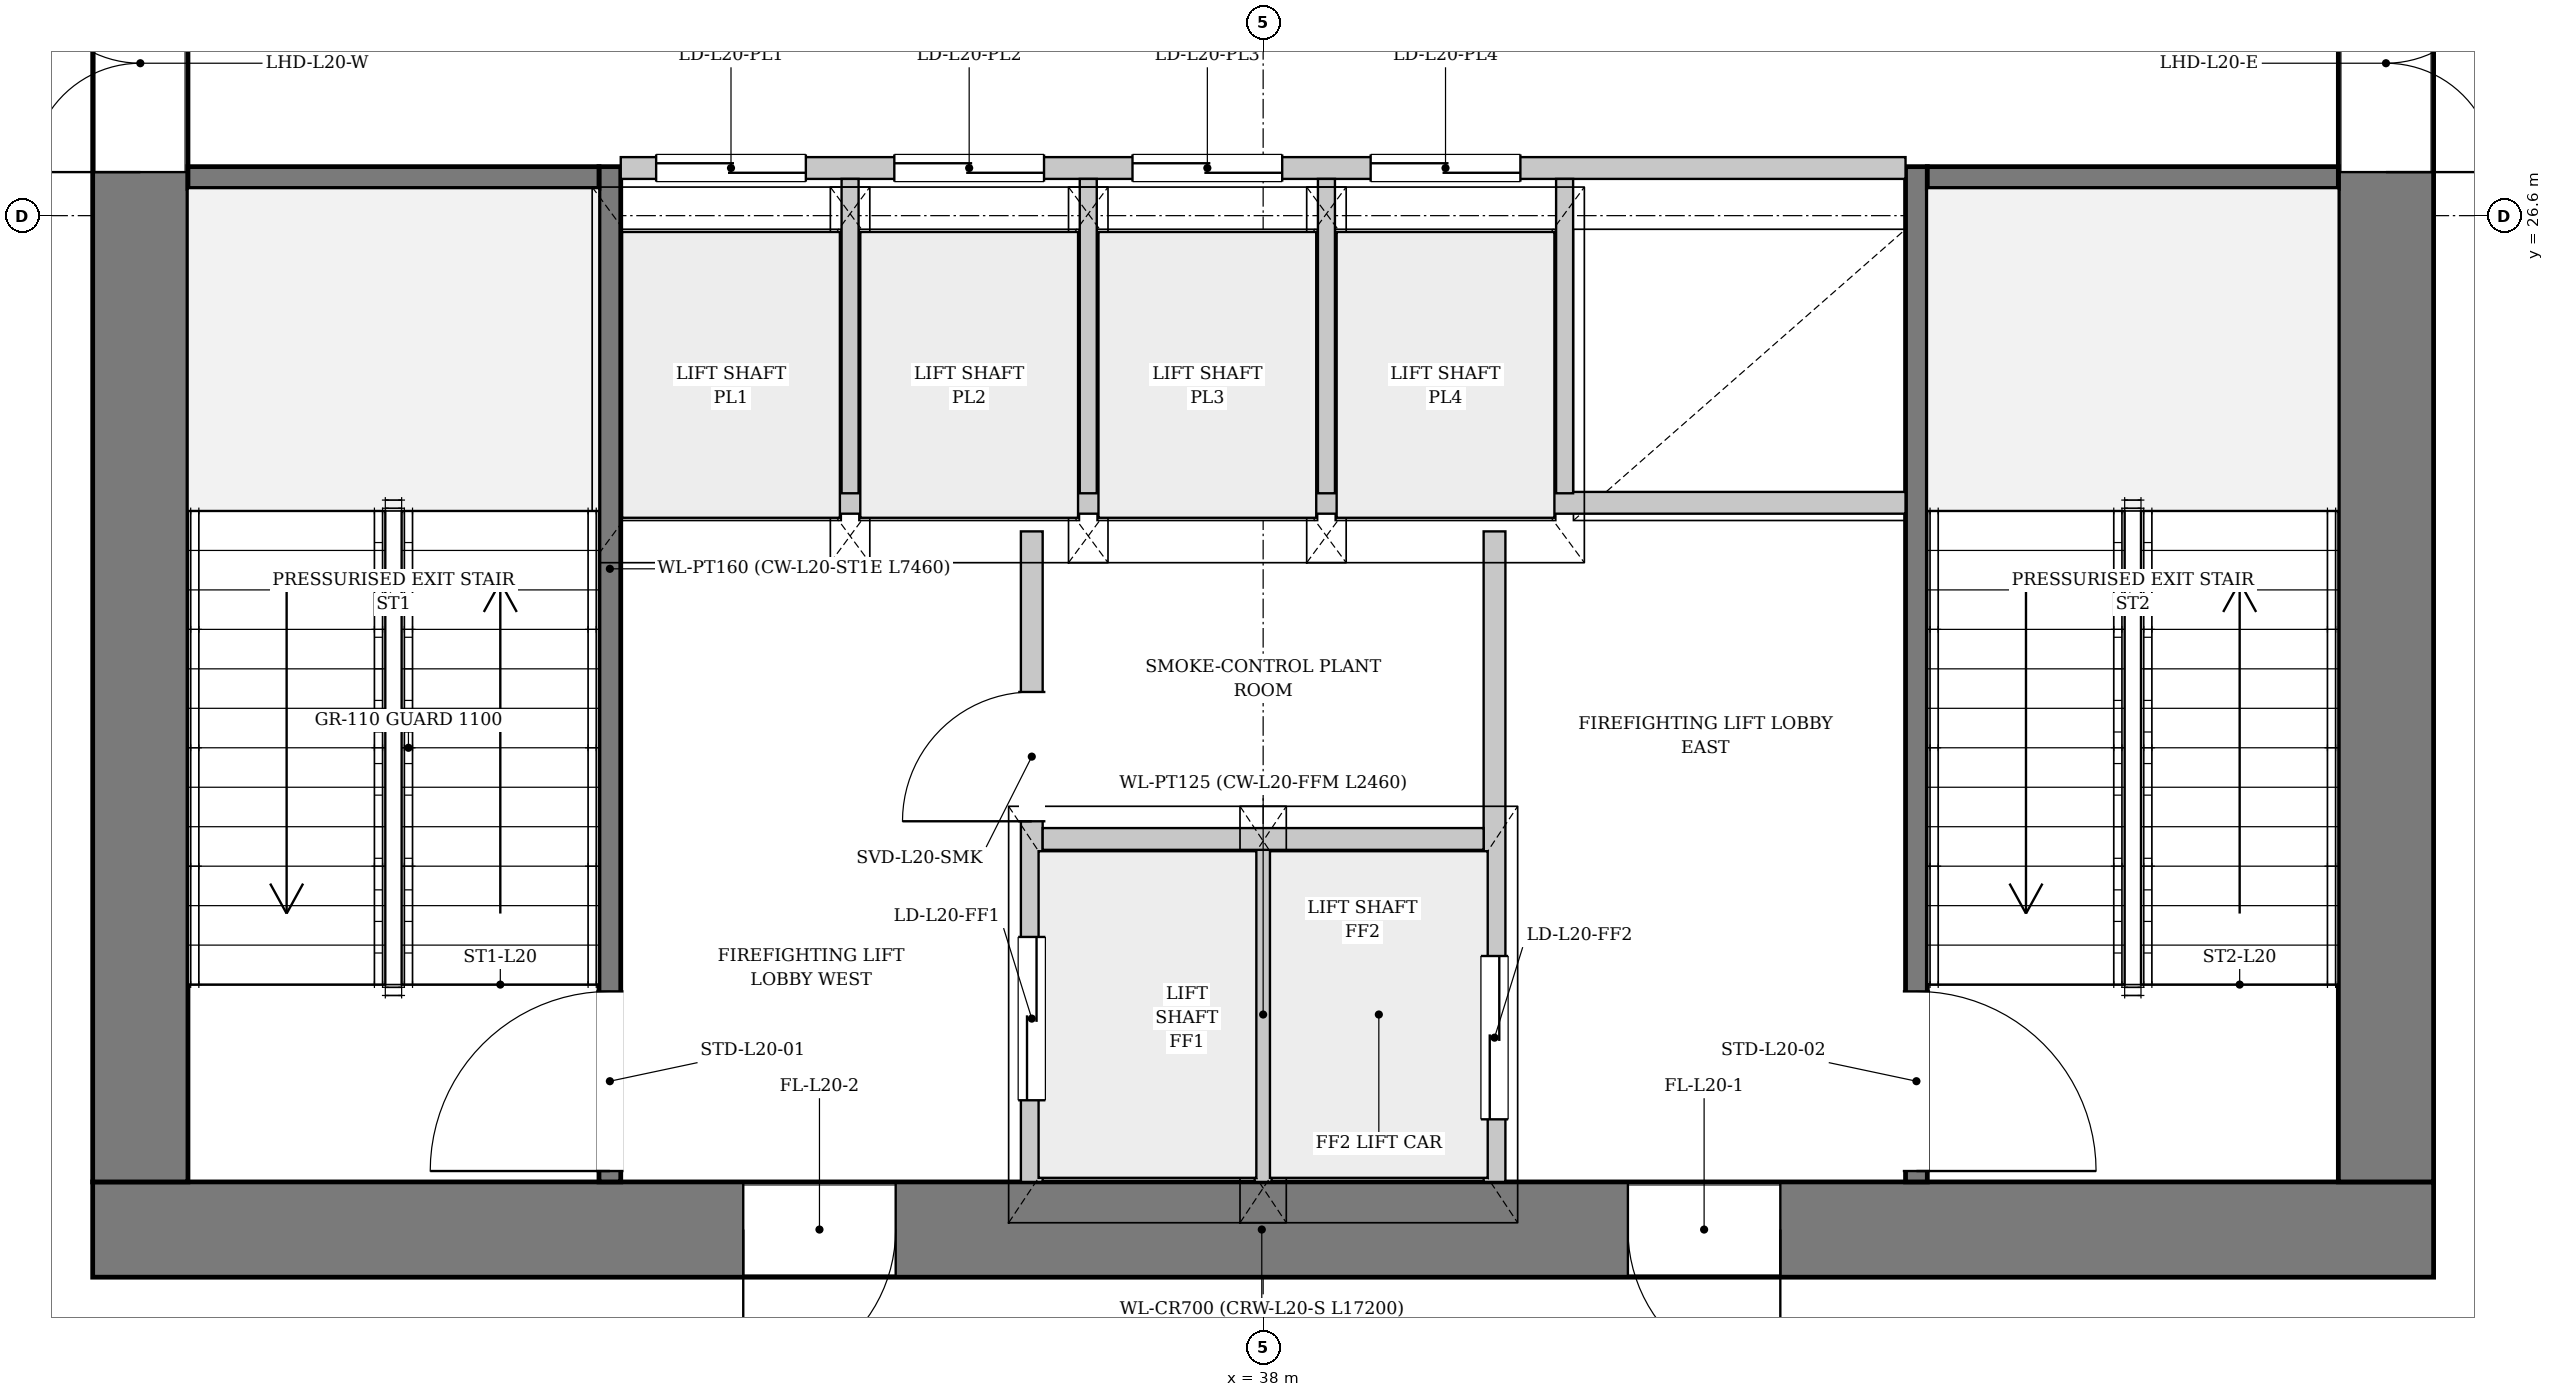
"""IFC4 building model, lengths in metres.
Left out: names, types, materials, properties, quantities, classifications, styles, units other than length and angle.
Written with IfcOpenShell. Run it as: python <this file> out.ifc"""

import sys

from ifc_helpers import new_model, si_unit, direction, frame, frame_2d, origin, place, context, subcontext, project, spatial, rectangle, extrude, source, transform, mapped, element, fill, save


model = new_model("IFC4")
c1 = context("Model", 3, precision=1e-05, world=origin(), true_north=direction((0.0, 1.0)))
c2 = subcontext(c1, "Body", "Model", "MODEL_VIEW")
j1 = project(units=[si_unit("LENGTHUNIT", "METRE"), si_unit("PLANEANGLEUNIT", "RADIAN")], contexts=[c1])
p1 = place(None, origin())
s1 = spatial("IfcSite", under=j1, at=p1, CompositionType="ELEMENT")
p2 = place(p1, origin())
s2 = spatial("IfcBuilding", under=s1, at=p2, CompositionType="ELEMENT")
p3 = place(p2, frame((0.0, 0.0, 79.9)))
s3 = spatial("IfcBuildingStorey", under=s2, at=p3, CompositionType="ELEMENT", Elevation=79.9)
p4 = place(p3, frame((46.6, 19.15, 0.0), z_axis=(0.0, 0.0, 1.0), x_axis=(-1.0, 0.0, 0.0)))
e1 = element("IfcWall", 1, at=p4, inside=s3, PredefinedType="SHEAR", context=c2, shape_type="SweptSolid", body=[
    extrude(rectangle(XDim=17.2, YDim=0.7, at=frame_2d((8.6, 0.0))), origin(), (0.0, 0.0, 1.0), 4.25),
])
p5 = place(p4, frame((4.8, 0.0, 0.0)))
e2 = element("IfcOpeningElement", 2, at=p5, cuts=e1, PredefinedType="OPENING", context=c2, shape_type="SweptSolid", body=[
    extrude(rectangle(XDim=1.12, YDim=2.25, at=frame_2d((0.56, 1.125))), frame((0.0, 0.36, 0.0), z_axis=(0.0, -1.0, 0.0), x_axis=(1.0, 0.0, 0.0)), (0.0, 0.0, 1.0), 0.72),
])
p6 = place(p4, frame((11.3, 0.0, 0.0)))
e3 = element("IfcOpeningElement", 3, at=p6, cuts=e1, PredefinedType="OPENING", context=c2, shape_type="SweptSolid", body=[
    extrude(rectangle(XDim=1.12, YDim=2.25, at=frame_2d((0.56, 1.125))), frame((0.0, 0.36, 0.0), z_axis=(0.0, -1.0, 0.0), x_axis=(1.0, 0.0, 0.0)), (0.0, 0.0, 1.0), 0.72),
])
p7 = place(p3, frame((29.75, 19.5, 0.0), z_axis=(0.0, 0.0, 1.0), x_axis=(0.0, 1.0, 0.0)))
e4 = element("IfcWall", 4, at=p7, inside=s3, PredefinedType="SHEAR", context=c2, shape_type="SweptSolid", body=[
    extrude(rectangle(XDim=14.2, YDim=0.7, at=frame_2d((7.1, 0.0))), origin(), (0.0, 0.0, 1.0), 4.25),
])
p8 = place(p7, frame((7.42, 0.0, 0.0)))
e5 = element("IfcOpeningElement", 5, at=p8, cuts=e4, PredefinedType="OPENING", context=c2, shape_type="SweptSolid", body=[
    extrude(rectangle(XDim=1.6, YDim=2.2, at=frame_2d((0.8, 1.1))), frame((0.0, 0.36, 0.0), z_axis=(0.0, -1.0, 0.0), x_axis=(1.0, 0.0, 0.0)), (0.0, 0.0, 1.0), 0.72),
])
p9 = place(p3, frame((46.25, 33.7, 0.0), z_axis=(0.0, 0.0, 1.0), x_axis=(0.0, -1.0, 0.0)))
e6 = element("IfcWall", 6, at=p9, inside=s3, PredefinedType="SHEAR", context=c2, shape_type="SweptSolid", body=[
    extrude(rectangle(XDim=14.2, YDim=0.7, at=frame_2d((7.1, 0.0))), origin(), (0.0, 0.0, 1.0), 4.25),
])
p10 = place(p9, frame((5.18, 0.0, 0.0)))
e7 = element("IfcOpeningElement", 7, at=p10, cuts=e6, PredefinedType="OPENING", context=c2, shape_type="SweptSolid", body=[
    extrude(rectangle(XDim=1.6, YDim=2.2, at=frame_2d((0.8, 1.1))), frame((0.0, 0.36, 0.0), z_axis=(0.0, -1.0, 0.0), x_axis=(1.0, 0.0, 0.0)), (0.0, 0.0, 1.0), 0.72),
])
p11 = place(p3, frame((33.2, 19.5, 0.0), z_axis=(0.0, 0.0, 1.0), x_axis=(0.0, 1.0, 0.0)))
e8 = element("IfcWall", 8, at=p11, inside=s3, PredefinedType="PARTITIONING", context=c2, shape_type="SweptSolid", body=[
    extrude(rectangle(XDim=7.46, YDim=0.16, at=frame_2d((3.73, 0.0))), origin(), (0.0, 0.0, 1.0), 4.25),
])
p12 = place(p11, frame((0.08, 0.0, 0.0)))
e9 = element("IfcOpeningElement", 9, at=p12, cuts=e8, PredefinedType="OPENING", context=c2, shape_type="SweptSolid", body=[
    extrude(rectangle(XDim=1.32, YDim=2.2, at=frame_2d((0.66, 1.1))), frame((0.0, 0.09, 0.0), z_axis=(0.0, -1.0, 0.0), x_axis=(1.0, 0.0, 0.0)), (0.0, 0.0, 1.0), 0.18),
])
p13 = place(p3, frame((30.1, 26.88, 0.0), z_axis=(0.0, 0.0, 1.0), x_axis=(1.0, 0.0, 0.0)))
e10 = element("IfcWall", 10, at=p13, inside=s3, PredefinedType="PARTITIONING", context=c2, shape_type="SweptSolid", body=[
    extrude(rectangle(XDim=3.02, YDim=0.16, at=frame_2d((1.51, 0.0))), origin(), (0.0, 0.0, 1.0), 4.25),
])
p14 = place(p3, frame((42.8, 26.96, 0.0), z_axis=(0.0, 0.0, 1.0), x_axis=(0.0, -1.0, 0.0)))
e11 = element("IfcWall", 11, at=p14, inside=s3, PredefinedType="PARTITIONING", context=c2, shape_type="SweptSolid", body=[
    extrude(rectangle(XDim=7.46, YDim=0.16, at=frame_2d((3.73, 0.0))), origin(), (0.0, 0.0, 1.0), 4.25),
])
p15 = place(p14, frame((6.06, 0.0, 0.0)))
e12 = element("IfcOpeningElement", 12, at=p15, cuts=e11, PredefinedType="OPENING", context=c2, shape_type="SweptSolid", body=[
    extrude(rectangle(XDim=1.32, YDim=2.2, at=frame_2d((0.66, 1.1))), frame((0.0, 0.09, 0.0), z_axis=(0.0, -1.0, 0.0), x_axis=(1.0, 0.0, 0.0)), (0.0, 0.0, 1.0), 0.18),
])
p16 = place(p3, frame((42.88, 26.88, 0.0), z_axis=(0.0, 0.0, 1.0), x_axis=(1.0, 0.0, 0.0)))
e13 = element("IfcWall", 13, at=p16, inside=s3, PredefinedType="PARTITIONING", context=c2, shape_type="SweptSolid", body=[
    extrude(rectangle(XDim=3.02, YDim=0.16, at=frame_2d((1.51, 0.0))), origin(), (0.0, 0.0, 1.0), 4.25),
])
p17 = place(p3, frame((36.3, 19.5, 0.0), z_axis=(0.0, 0.0, 1.0), x_axis=(0.0, 1.0, 0.0)))
e14 = element("IfcWall", 14, at=p17, inside=s3, PredefinedType="PARTITIONING", context=c2, shape_type="SweptSolid", body=[
    extrude(rectangle(XDim=4.78, YDim=0.16, at=frame_2d((2.39, 0.0))), origin(), (0.0, 0.0, 1.0), 4.25),
])
p18 = place(p17, frame((0.6, 0.0, 0.0)))
e15 = element("IfcOpeningElement", 15, at=p18, cuts=e14, PredefinedType="OPENING", context=c2, shape_type="SweptSolid", body=[
    extrude(rectangle(XDim=1.2, YDim=2.2, at=frame_2d((0.6, 1.1))), frame((0.0, 0.09, 0.0), z_axis=(0.0, -1.0, 0.0), x_axis=(1.0, 0.0, 0.0)), (0.0, 0.0, 1.0), 0.18),
])
p19 = place(p17, frame((2.65, 0.0, 0.0)))
e16 = element("IfcOpeningElement", 16, at=p19, cuts=e14, PredefinedType="OPENING", context=c2, shape_type="SweptSolid", body=[
    extrude(rectangle(XDim=0.95, YDim=2.1, at=frame_2d((0.475, 1.05))), frame((0.0, 0.09, 0.0), z_axis=(0.0, -1.0, 0.0), x_axis=(1.0, 0.0, 0.0)), (0.0, 0.0, 1.0), 0.18),
])
p20 = place(p3, frame((39.7, 24.28, 0.0), z_axis=(0.0, 0.0, 1.0), x_axis=(0.0, -1.0, 0.0)))
e17 = element("IfcWall", 17, at=p20, inside=s3, PredefinedType="PARTITIONING", context=c2, shape_type="SweptSolid", body=[
    extrude(rectangle(XDim=4.78, YDim=0.16, at=frame_2d((2.39, 0.0))), origin(), (0.0, 0.0, 1.0), 4.25),
])
p21 = place(p20, frame((3.12, 0.0, 0.0)))
e18 = element("IfcOpeningElement", 18, at=p21, cuts=e17, PredefinedType="OPENING", context=c2, shape_type="SweptSolid", body=[
    extrude(rectangle(XDim=1.2, YDim=2.2, at=frame_2d((0.6, 1.1))), frame((0.0, 0.09, 0.0), z_axis=(0.0, -1.0, 0.0), x_axis=(1.0, 0.0, 0.0)), (0.0, 0.0, 1.0), 0.18),
])
p22 = place(p3, frame((38.0, 19.5, 0.0), z_axis=(0.0, 0.0, 1.0), x_axis=(0.0, 1.0, 0.0)))
e19 = element("IfcWall", 19, at=p22, inside=s3, PredefinedType="PARTITIONING", context=c2, shape_type="SweptSolid", body=[
    extrude(rectangle(XDim=2.46, YDim=0.125, at=frame_2d((1.23, 0.0))), origin(), (0.0, 0.0, 1.0), 4.25),
])
p23 = place(p3, frame((36.38, 22.02, 0.0), z_axis=(0.0, 0.0, 1.0), x_axis=(1.0, 0.0, 0.0)))
e20 = element("IfcWall", 20, at=p23, inside=s3, PredefinedType="PARTITIONING", context=c2, shape_type="SweptSolid", body=[
    extrude(rectangle(XDim=3.24, YDim=0.16, at=frame_2d((1.62, 0.0))), origin(), (0.0, 0.0, 1.0), 4.25),
])
p24 = place(p3, frame((33.28, 24.49, 0.0), z_axis=(0.0, 0.0, 1.0), x_axis=(1.0, 0.0, 0.0)))
e21 = element("IfcWall", 21, at=p24, inside=s3, PredefinedType="PARTITIONING", context=c2, shape_type="SweptSolid", body=[
    extrude(rectangle(XDim=9.44, YDim=0.16, at=frame_2d((4.72, 0.0))), origin(), (0.0, 0.0, 1.0), 4.25),
])
p25 = place(p3, frame((33.28, 26.95, 0.0), z_axis=(0.0, 0.0, 1.0), x_axis=(1.0, 0.0, 0.0)))
e22 = element("IfcWall", 22, at=p25, inside=s3, PredefinedType="PARTITIONING", context=c2, shape_type="SweptSolid", body=[
    extrude(rectangle(XDim=9.44, YDim=0.16, at=frame_2d((4.72, 0.0))), origin(), (0.0, 0.0, 1.0), 4.25),
])
p26 = place(p25, frame((0.26, 0.0, 0.0)))
e23 = element("IfcOpeningElement", 23, at=p26, cuts=e22, PredefinedType="OPENING", context=c2, shape_type="SweptSolid", body=[
    extrude(rectangle(XDim=1.1, YDim=2.2, at=frame_2d((0.55, 1.1))), frame((0.0, 0.09, 0.0), z_axis=(0.0, -1.0, 0.0), x_axis=(1.0, 0.0, 0.0)), (0.0, 0.0, 1.0), 0.18),
])
p27 = place(p25, frame((2.01, 0.0, 0.0)))
e24 = element("IfcOpeningElement", 24, at=p27, cuts=e22, PredefinedType="OPENING", context=c2, shape_type="SweptSolid", body=[
    extrude(rectangle(XDim=1.1, YDim=2.2, at=frame_2d((0.55, 1.1))), frame((0.0, 0.09, 0.0), z_axis=(0.0, -1.0, 0.0), x_axis=(1.0, 0.0, 0.0)), (0.0, 0.0, 1.0), 0.18),
])
p28 = place(p25, frame((3.76, 0.0, 0.0)))
e25 = element("IfcOpeningElement", 25, at=p28, cuts=e22, PredefinedType="OPENING", context=c2, shape_type="SweptSolid", body=[
    extrude(rectangle(XDim=1.1, YDim=2.2, at=frame_2d((0.55, 1.1))), frame((0.0, 0.09, 0.0), z_axis=(0.0, -1.0, 0.0), x_axis=(1.0, 0.0, 0.0)), (0.0, 0.0, 1.0), 0.18),
])
p29 = place(p25, frame((5.51, 0.0, 0.0)))
e26 = element("IfcOpeningElement", 26, at=p29, cuts=e22, PredefinedType="OPENING", context=c2, shape_type="SweptSolid", body=[
    extrude(rectangle(XDim=1.1, YDim=2.2, at=frame_2d((0.55, 1.1))), frame((0.0, 0.09, 0.0), z_axis=(0.0, -1.0, 0.0), x_axis=(1.0, 0.0, 0.0)), (0.0, 0.0, 1.0), 0.18),
])
for number, where, z_axis, x_axis in (
    (27, (34.965, 24.56, 0.0), (0.0, 0.0, 1.0), (0.0, 1.0, 0.0)),
    (28, (36.715, 24.56, 0.0), (0.0, 0.0, 1.0), (0.0, 1.0, 0.0)),
    (29, (38.465, 24.56, 0.0), (0.0, 0.0, 1.0), (0.0, 1.0, 0.0)),
    (30, (40.215, 24.56, 0.0), (0.0, 0.0, 1.0), (0.0, 1.0, 0.0)),
):
    element("IfcWall", number, at=place(p3, frame(where, z_axis=z_axis, x_axis=x_axis)), inside=s3, PredefinedType="PARTITIONING", context=c2, shape_type="SweptSolid", body=[
        extrude(rectangle(XDim=2.31, YDim=0.125, at=frame_2d((1.155, 0.0))), origin(), (0.0, 0.0, 1.0), 4.25),
    ])
m1 = source(origin(), c2, "Body", "SweptSolid", [
    extrude(rectangle(XDim=1.12, YDim=2.25, at=frame_2d((0.56, 1.125))), frame((0.0, 0.025, 0.0), z_axis=(0.0, -1.0, 0.0), x_axis=(1.0, 0.0, 0.0)), (0.0, 0.0, 1.0), 0.05),
])
p30 = place(p5, origin())
e31 = element("IfcDoor", 31, at=p30, inside=s3, OperationType="SINGLE_SWING_LEFT", PredefinedType="DOOR", context=c2, shape_type="MappedRepresentation", body=[
    mapped(m1, transform((0.0, 0.0, 0.0), x_axis=(1.0, 0.0, 0.0), y_axis=(0.0, 1.0, 0.0), z_axis=(0.0, 0.0, 1.0), scale=1.0)),
])
fill(e2, e31)
p31 = place(p6, origin())
e32 = element("IfcDoor", 32, at=p31, inside=s3, OperationType="SINGLE_SWING_RIGHT", PredefinedType="DOOR", context=c2, shape_type="MappedRepresentation", body=[
    mapped(m1, transform((0.0, 0.0, 0.0), x_axis=(1.0, 0.0, 0.0), y_axis=(0.0, 1.0, 0.0), z_axis=(0.0, 0.0, 1.0), scale=1.0)),
])
fill(e3, e32)
m2 = source(origin(), c2, "Body", "SweptSolid", [
    extrude(rectangle(XDim=1.6, YDim=2.2, at=frame_2d((0.8, 1.1))), frame((0.0, 0.025, 0.0), z_axis=(0.0, -1.0, 0.0), x_axis=(1.0, 0.0, 0.0)), (0.0, 0.0, 1.0), 0.05),
])
p32 = place(p8, origin())
e33 = element("IfcDoor", 33, at=p32, inside=s3, OperationType="DOUBLE_DOOR_SINGLE_SWING", PredefinedType="DOOR", context=c2, shape_type="MappedRepresentation", body=[
    mapped(m2, transform((0.0, 0.0, 0.0), x_axis=(1.0, 0.0, 0.0), y_axis=(0.0, 1.0, 0.0), z_axis=(0.0, 0.0, 1.0), scale=1.0)),
])
fill(e5, e33)
p33 = place(p10, origin())
e34 = element("IfcDoor", 34, at=p33, inside=s3, OperationType="DOUBLE_DOOR_SINGLE_SWING", PredefinedType="DOOR", context=c2, shape_type="MappedRepresentation", body=[
    mapped(m2, transform((0.0, 0.0, 0.0), x_axis=(1.0, 0.0, 0.0), y_axis=(0.0, 1.0, 0.0), z_axis=(0.0, 0.0, 1.0), scale=1.0)),
])
fill(e7, e34)
m3 = source(origin(), c2, "Body", "SweptSolid", [
    extrude(rectangle(XDim=1.32, YDim=2.2, at=frame_2d((0.66, 1.1))), frame((0.0, 0.025, 0.0), z_axis=(0.0, -1.0, 0.0), x_axis=(1.0, 0.0, 0.0)), (0.0, 0.0, 1.0), 0.05),
])
p34 = place(p12, origin())
e35 = element("IfcDoor", 35, at=p34, inside=s3, OperationType="SINGLE_SWING_LEFT", PredefinedType="DOOR", context=c2, shape_type="MappedRepresentation", body=[
    mapped(m3, transform((0.0, 0.0, 0.0), x_axis=(1.0, 0.0, 0.0), y_axis=(0.0, 1.0, 0.0), z_axis=(0.0, 0.0, 1.0), scale=1.0)),
])
fill(e9, e35)
p35 = place(p15, origin())
e36 = element("IfcDoor", 36, at=p35, inside=s3, OperationType="SINGLE_SWING_RIGHT", PredefinedType="DOOR", context=c2, shape_type="MappedRepresentation", body=[
    mapped(m3, transform((0.0, 0.0, 0.0), x_axis=(1.0, 0.0, 0.0), y_axis=(0.0, 1.0, 0.0), z_axis=(0.0, 0.0, 1.0), scale=1.0)),
])
fill(e12, e36)
m4 = source(origin(), c2, "Body", "SweptSolid", [
    extrude(rectangle(XDim=1.2, YDim=2.2, at=frame_2d((0.6, 1.1))), frame((0.0, 0.025, 0.0), z_axis=(0.0, -1.0, 0.0), x_axis=(1.0, 0.0, 0.0)), (0.0, 0.0, 1.0), 0.05),
])
p36 = place(p18, origin())
e37 = element("IfcDoor", 37, at=p36, inside=s3, OperationType="DOUBLE_DOOR_SLIDING", PredefinedType="DOOR", context=c2, shape_type="MappedRepresentation", body=[
    mapped(m4, transform((0.0, 0.0, 0.0), x_axis=(1.0, 0.0, 0.0), y_axis=(0.0, 1.0, 0.0), z_axis=(0.0, 0.0, 1.0), scale=1.0)),
])
fill(e15, e37)
m5 = source(origin(), c2, "Body", "SweptSolid", [
    extrude(rectangle(XDim=0.95, YDim=2.1, at=frame_2d((0.475, 1.05))), frame((0.0, 0.025, 0.0), z_axis=(0.0, -1.0, 0.0), x_axis=(1.0, 0.0, 0.0)), (0.0, 0.0, 1.0), 0.05),
])
p37 = place(p19, origin())
e38 = element("IfcDoor", 38, at=p37, inside=s3, OperationType="SINGLE_SWING_LEFT", PredefinedType="DOOR", context=c2, shape_type="MappedRepresentation", body=[
    mapped(m5, transform((0.0, 0.0, 0.0), x_axis=(1.0, 0.0, 0.0), y_axis=(0.0, 1.0, 0.0), z_axis=(0.0, 0.0, 1.0), scale=1.0)),
])
fill(e16, e38)
p38 = place(p21, origin())
e39 = element("IfcDoor", 39, at=p38, inside=s3, OperationType="DOUBLE_DOOR_SLIDING", PredefinedType="DOOR", context=c2, shape_type="MappedRepresentation", body=[
    mapped(m4, transform((0.0, 0.0, 0.0), x_axis=(1.0, 0.0, 0.0), y_axis=(0.0, 1.0, 0.0), z_axis=(0.0, 0.0, 1.0), scale=1.0)),
])
fill(e18, e39)
m6 = source(origin(), c2, "Body", "SweptSolid", [
    extrude(rectangle(XDim=1.1, YDim=2.2, at=frame_2d((0.55, 1.1))), frame((0.0, 0.025, 0.0), z_axis=(0.0, -1.0, 0.0), x_axis=(1.0, 0.0, 0.0)), (0.0, 0.0, 1.0), 0.05),
])
p39 = place(p26, origin())
e40 = element("IfcDoor", 40, at=p39, inside=s3, OperationType="DOUBLE_DOOR_SLIDING", PredefinedType="DOOR", context=c2, shape_type="MappedRepresentation", body=[
    mapped(m6, transform((0.0, 0.0, 0.0), x_axis=(1.0, 0.0, 0.0), y_axis=(0.0, 1.0, 0.0), z_axis=(0.0, 0.0, 1.0), scale=1.0)),
])
fill(e23, e40)
p40 = place(p27, origin())
e41 = element("IfcDoor", 41, at=p40, inside=s3, OperationType="DOUBLE_DOOR_SLIDING", PredefinedType="DOOR", context=c2, shape_type="MappedRepresentation", body=[
    mapped(m6, transform((0.0, 0.0, 0.0), x_axis=(1.0, 0.0, 0.0), y_axis=(0.0, 1.0, 0.0), z_axis=(0.0, 0.0, 1.0), scale=1.0)),
])
fill(e24, e41)
p41 = place(p28, origin())
e42 = element("IfcDoor", 42, at=p41, inside=s3, OperationType="DOUBLE_DOOR_SLIDING", PredefinedType="DOOR", context=c2, shape_type="MappedRepresentation", body=[
    mapped(m6, transform((0.0, 0.0, 0.0), x_axis=(1.0, 0.0, 0.0), y_axis=(0.0, 1.0, 0.0), z_axis=(0.0, 0.0, 1.0), scale=1.0)),
])
fill(e25, e42)
p42 = place(p29, origin())
e43 = element("IfcDoor", 43, at=p42, inside=s3, OperationType="DOUBLE_DOOR_SLIDING", PredefinedType="DOOR", context=c2, shape_type="MappedRepresentation", body=[
    mapped(m6, transform((0.0, 0.0, 0.0), x_axis=(1.0, 0.0, 0.0), y_axis=(0.0, 1.0, 0.0), z_axis=(0.0, 0.0, 1.0), scale=1.0)),
])
fill(e26, e43)
save(model, sys.argv[1])
